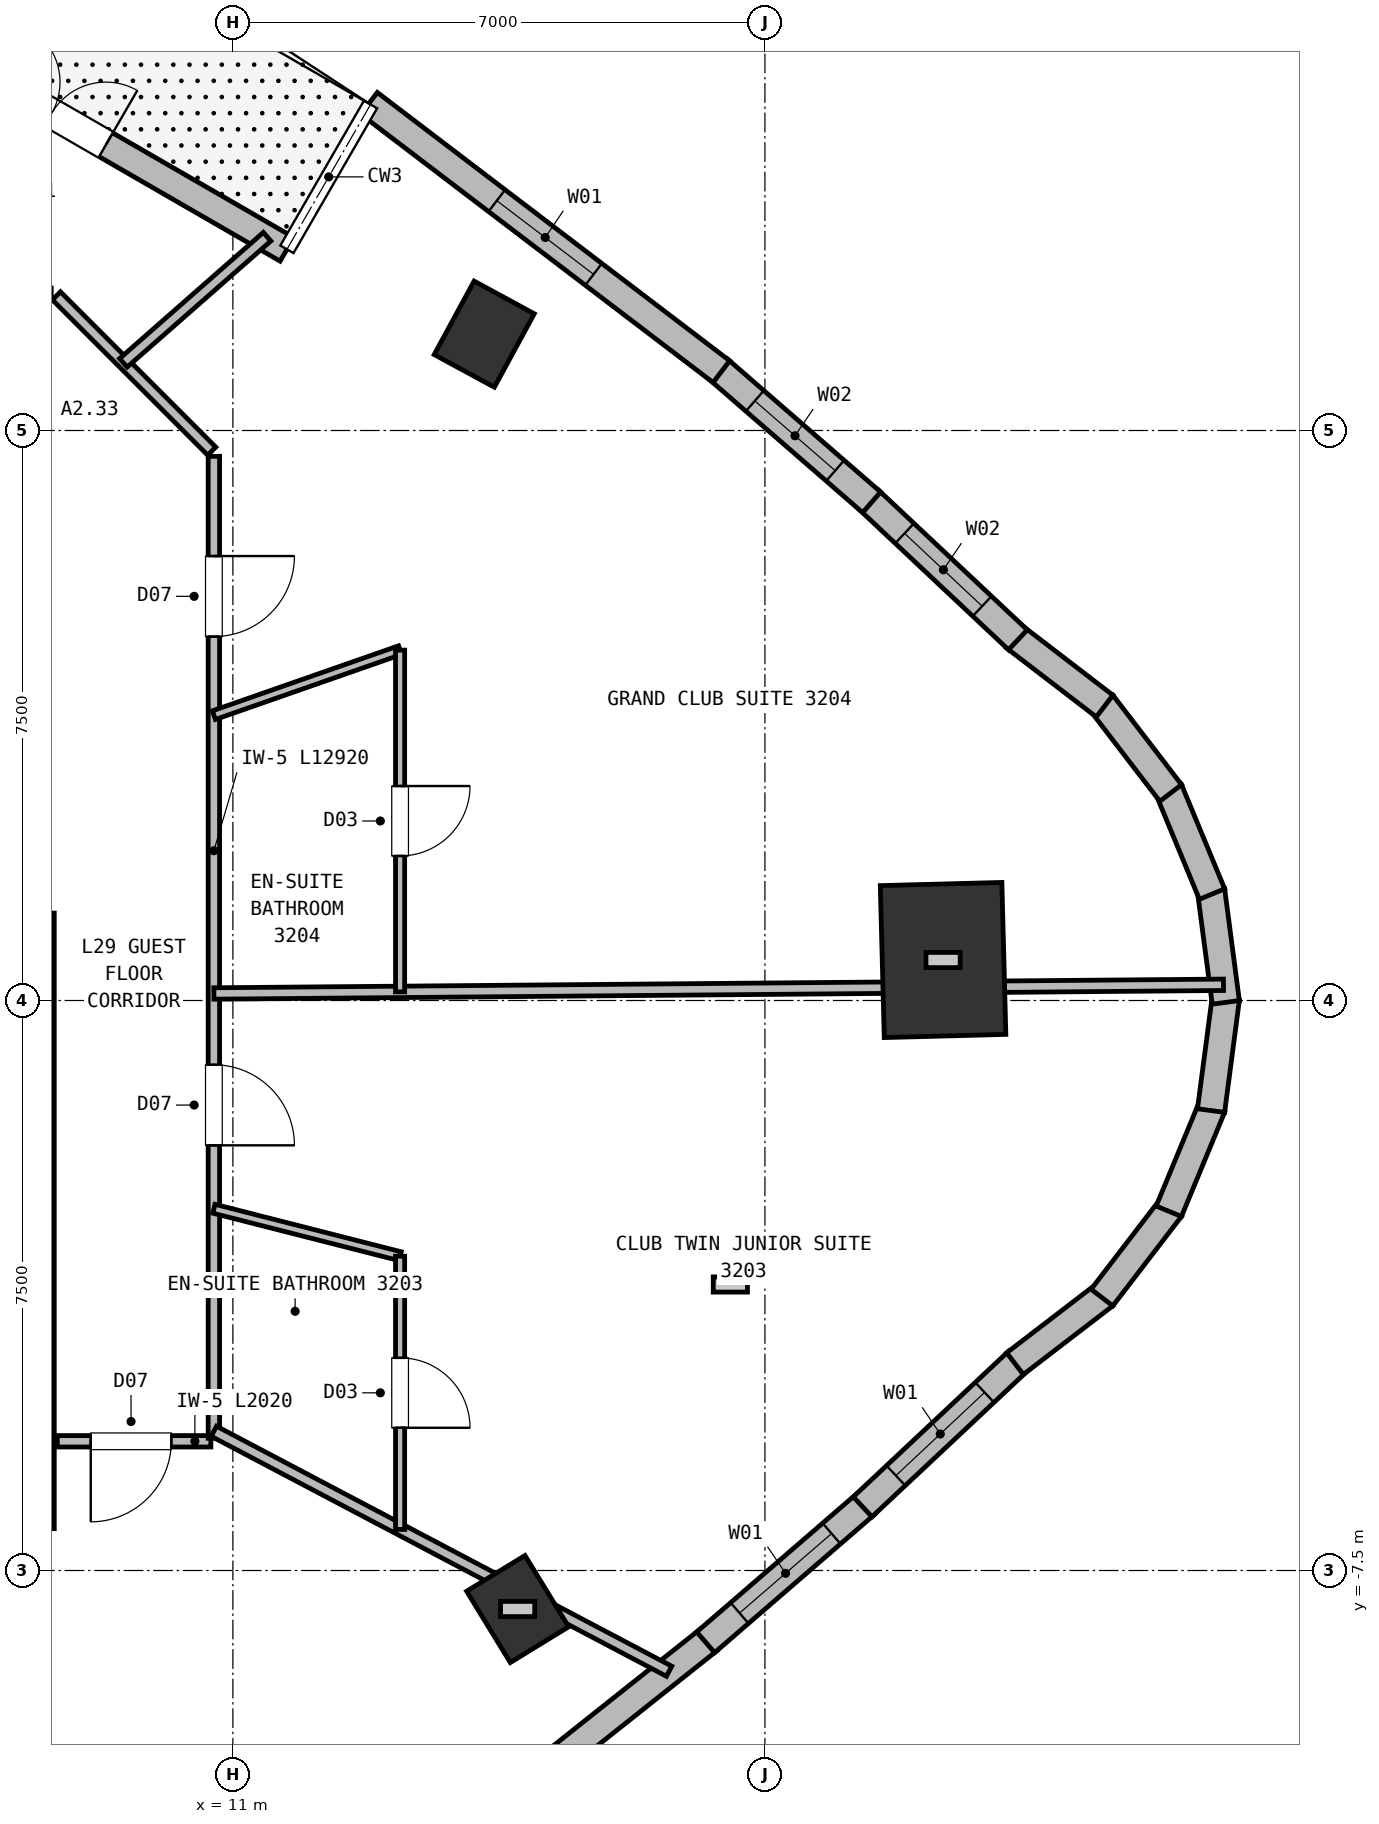
"""IFC4 building model, lengths in metres.
Left out: names, types, materials, properties, quantities, classifications, styles, units other than length and angle.
Written with IfcOpenShell. Run it as: python <this file> out.ifc"""

import sys

from ifc_helpers import new_model, si_unit, direction, frame, frame_2d, origin, origin_2d, place, context, subcontext, project, spatial, rectangle, extrude, element, fill, save


model = new_model("IFC4")
c1 = context("Model", 3, precision=1e-05, world=origin(), true_north=direction((0.0, 1.0)))
c2 = subcontext(c1, "Body", "Model", "MODEL_VIEW")
j1 = project(units=[si_unit("LENGTHUNIT", "METRE"), si_unit("PLANEANGLEUNIT", "RADIAN")], contexts=[c1])
p1 = place(None, origin())
s1 = spatial("IfcSite", under=j1, at=p1, CompositionType="ELEMENT")
p2 = place(p1, origin())
s2 = spatial("IfcBuilding", under=s1, at=p2, CompositionType="ELEMENT")
p3 = place(p2, frame((0.0, 0.0, 119.75)))
s3 = spatial("IfcBuildingStorey", under=s2, at=p3, CompositionType="ELEMENT", Elevation=119.75)
p4 = place(p3, frame((8.35, -6.95, 0.0), z_axis=(0.0, 0.0, 1.0), x_axis=(0.0, 1.0, 0.0)))
e1 = element("IfcWall", 1, at=p4, inside=s3, PredefinedType="SHEAR", context=c2, shape_type="SweptSolid", body=[
    extrude(rectangle(XDim=8.1, YDim=0.6, at=frame_2d((4.05, 0.0))), origin(), (0.0, 0.0, 1.0), 3.5),
])
p5 = place(p3, frame((14.747, -8.007, 0.0), z_axis=(0.0, 0.0, 1.0), x_axis=(0.852640164354, 0.522498564716, 0.0)))
e2 = element("IfcColumn", 2, at=p5, inside=s3, PredefinedType="COLUMN", context=c2, shape_type="SweptSolid", body=[
    extrude(rectangle(XDim=0.9, YDim=1.1, at=origin_2d()), origin(), (0.0, 0.0, 1.0), 3.75),
])
p6 = place(p3, frame((20.344, 0.533, 0.0), z_axis=(0.0, 0.0, 1.0), x_axis=(0.999657324976, 0.026176948308, 0.0)))
e3 = element("IfcColumn", 3, at=p6, inside=s3, PredefinedType="COLUMN", context=c2, shape_type="SweptSolid", body=[
    extrude(rectangle(XDim=1.6, YDim=2.0, at=origin_2d()), origin(), (0.0, 0.0, 1.0), 3.75),
])
p7 = place(p3, frame((14.307, 8.767, 0.0), z_axis=(0.0, 0.0, 1.0), x_axis=(-0.878817112662, 0.47715876026, 0.0)))
e4 = element("IfcColumn", 4, at=p7, inside=s3, PredefinedType="COLUMN", context=c2, shape_type="SweptSolid", body=[
    extrude(rectangle(XDim=0.9, YDim=1.1, at=origin_2d()), origin(), (0.0, 0.0, 1.0), 3.75),
])
p8 = place(p3, frame((2.705, 15.084, 0.0), z_axis=(0.0, 0.0, 1.0), x_axis=(0.866025696342, -0.499999493275, 0.0)))
e5 = element("IfcWall", 5, at=p8, inside=s3, PredefinedType="SOLIDWALL", context=c2, shape_type="SweptSolid", body=[
    extrude(rectangle(XDim=10.4, YDim=0.36, at=frame_2d((5.2, 0.0))), origin(), (0.0, 0.0, 1.0), 3.5),
])
p9 = place(p8, frame((6.0, 0.0, 0.0)))
e6 = element("IfcOpeningElement", 6, at=p9, cuts=e5, PredefinedType="OPENING", context=c2, shape_type="SweptSolid", body=[
    extrude(rectangle(XDim=1.65, YDim=2.25, at=frame_2d((0.825, 1.125))), frame((0.0, 0.19, 0.0), z_axis=(0.0, -1.0, 0.0), x_axis=(1.0, 0.0, 0.0)), (0.0, 0.0, 1.0), 0.38),
])
p10 = place(p3, frame((17.259, -8.413, 0.0), z_axis=(0.0, 0.0, 1.0), x_axis=(-0.783005616034, -0.622014634281, 0.0)))
e7 = element("IfcWall", 7, at=p10, inside=s3, PredefinedType="SOLIDWALL", context=c2, shape_type="SweptSolid", body=[
    extrude(rectangle(XDim=2.759, YDim=0.36, at=frame_2d((1.379, 0.0))), origin(), (0.0, 0.0, 1.0), 3.5),
])
p11 = place(p3, frame((19.323, -6.629, 0.0), z_axis=(0.0, 0.0, 1.0), x_axis=(-0.756738013258, -0.65371827211, 0.0)))
e8 = element("IfcWall", 8, at=p11, inside=s3, PredefinedType="SOLIDWALL", context=c2, shape_type="SweptSolid", body=[
    extrude(rectangle(XDim=2.777, YDim=0.36, at=frame_2d((1.389, 0.0))), origin(), (0.0, 0.0, 1.0), 3.5),
])
p12 = place(p11, frame((0.589, 0.0, 0.72)))
e9 = element("IfcOpeningElement", 9, at=p12, cuts=e8, PredefinedType="OPENING", context=c2, shape_type="SweptSolid", body=[
    extrude(rectangle(XDim=1.6, YDim=1.88, at=frame_2d((0.8, 0.94))), frame((0.0, 0.19, 0.0), z_axis=(0.0, -1.0, 0.0), x_axis=(1.0, 0.0, 0.0)), (0.0, 0.0, 1.0), 0.38),
])
p13 = place(p3, frame((21.329, -4.746, 0.0), z_axis=(0.0, 0.0, 1.0), x_axis=(-0.729447500313, -0.684036800389, 0.0)))
e10 = element("IfcWall", 10, at=p13, inside=s3, PredefinedType="SOLIDWALL", context=c2, shape_type="SweptSolid", body=[
    extrude(rectangle(XDim=2.801, YDim=0.36, at=frame_2d((1.4, 0.0))), origin(), (0.0, 0.0, 1.0), 3.5),
])
p14 = place(p13, frame((0.601, 0.0, 0.72)))
e11 = element("IfcOpeningElement", 11, at=p14, cuts=e10, PredefinedType="OPENING", context=c2, shape_type="SweptSolid", body=[
    extrude(rectangle(XDim=1.6, YDim=1.88, at=frame_2d((0.8, 0.94))), frame((0.0, 0.19, 0.0), z_axis=(0.0, -1.0, 0.0), x_axis=(1.0, 0.0, 0.0)), (0.0, 0.0, 1.0), 0.38),
])
for number, where, z_axis, x_axis in (
    (12, (22.469, -3.874, 0.0), (0.0, 0.0, 1.0), (-0.793, -0.609, 0.0)),
    (13, (23.339, -2.73, 0.0), (0.0, 0.0, 1.0), (-0.609, -0.793, 0.0)),
    (14, (23.883, -1.4, 0.0), (0.0, 0.0, 1.0), (-0.383, -0.924, 0.0)),
    (15, (24.064, 0.025, 0.0), (0.0, 0.0, 1.0), (-0.131, -0.991, 0.0)),
    (16, (23.87, 1.448, 0.0), (0.0, 0.0, 1.0), (0.131, -0.991, 0.0)),
    (17, (23.314, 2.773, 0.0), (0.0, 0.0, 1.0), (0.383, -0.924, 0.0)),
    (18, (22.434, 3.909, 0.0), (0.0, 0.0, 1.0), (0.609, -0.793, 0.0)),
    (19, (21.291, 4.778, 0.0), (0.0, 0.0, 1.0), (0.793, -0.609, 0.0)),
):
    element("IfcWall", number, at=place(p3, frame(where, z_axis=z_axis, x_axis=x_axis)), inside=s3, PredefinedType="SOLIDWALL", context=c2, shape_type="SweptSolid", body=[
        extrude(rectangle(XDim=1.486, YDim=0.36, at=frame_2d((0.743, 0.0))), origin(), (0.0, 0.0, 1.0), 3.5),
    ])
p15 = place(p3, frame((19.367, 6.589, 0.0), z_axis=(0.0, 0.0, 1.0), x_axis=(0.728891962159, -0.684628736981, 0.0)))
e20 = element("IfcWall", 20, at=p15, inside=s3, PredefinedType="SOLIDWALL", context=c2, shape_type="SweptSolid", body=[
    extrude(rectangle(XDim=2.692, YDim=0.36, at=frame_2d((1.346, 0.0))), origin(), (0.0, 0.0, 1.0), 3.5),
])
p16 = place(p15, frame((0.646, 0.0, 0.72)))
e21 = element("IfcOpeningElement", 21, at=p16, cuts=e20, PredefinedType="OPENING", context=c2, shape_type="SweptSolid", body=[
    extrude(rectangle(XDim=1.4, YDim=1.84, at=frame_2d((0.7, 0.92))), frame((0.0, 0.19, 0.0), z_axis=(0.0, -1.0, 0.0), x_axis=(1.0, 0.0, 0.0)), (0.0, 0.0, 1.0), 0.38),
])
p17 = place(p3, frame((17.388, 8.306, 0.0), z_axis=(0.0, 0.0, 1.0), x_axis=(0.755058136048, -0.655657846126, 0.0)))
e22 = element("IfcWall", 22, at=p17, inside=s3, PredefinedType="SOLIDWALL", context=c2, shape_type="SweptSolid", body=[
    extrude(rectangle(XDim=2.67, YDim=0.36, at=frame_2d((1.335, 0.0))), origin(), (0.0, 0.0, 1.0), 3.5),
])
p18 = place(p17, frame((0.635, 0.0, 0.72)))
e23 = element("IfcOpeningElement", 23, at=p18, cuts=e22, PredefinedType="OPENING", context=c2, shape_type="SweptSolid", body=[
    extrude(rectangle(XDim=1.4, YDim=1.84, at=frame_2d((0.7, 0.92))), frame((0.0, 0.19, 0.0), z_axis=(0.0, -1.0, 0.0), x_axis=(1.0, 0.0, 0.0)), (0.0, 0.0, 1.0), 0.38),
])
p19 = place(p3, frame((12.791, 11.805, 0.0), z_axis=(0.0, 0.0, 1.0), x_axis=(0.795558665525, -0.605876563095, 0.0)))
e24 = element("IfcWall", 24, at=p19, inside=s3, PredefinedType="SOLIDWALL", context=c2, shape_type="SweptSolid", body=[
    extrude(rectangle(XDim=5.827, YDim=0.36, at=frame_2d((2.913, 0.0))), origin(), (0.0, 0.0, 1.0), 3.5),
])
p20 = place(p19, frame((2.113, 0.0, 0.72)))
e25 = element("IfcOpeningElement", 25, at=p20, cuts=e24, PredefinedType="OPENING", context=c2, shape_type="SweptSolid", body=[
    extrude(rectangle(XDim=1.6, YDim=1.88, at=frame_2d((0.8, 0.94))), frame((0.0, 0.19, 0.0), z_axis=(0.0, -1.0, 0.0), x_axis=(1.0, 0.0, 0.0)), (0.0, 0.0, 1.0), 0.38),
])
p21 = place(p3, frame((10.71, -5.8, 0.0), z_axis=(0.0, 0.0, 1.0), x_axis=(-1.0, 0.0, 0.0)))
e26 = element("IfcWall", 26, at=p21, inside=s3, PredefinedType="PARTITIONING", context=c2, shape_type="SweptSolid", body=[
    extrude(rectangle(XDim=2.02, YDim=0.15, at=frame_2d((1.01, 0.0))), origin(), (0.0, 0.0, 1.0), 3.5),
])
p22 = place(p21, frame((0.52, 0.0, 0.0)))
e27 = element("IfcOpeningElement", 27, at=p22, cuts=e26, PredefinedType="OPENING", context=c2, shape_type="SweptSolid", body=[
    extrude(rectangle(XDim=1.06, YDim=2.15, at=frame_2d((0.53, 1.075))), frame((0.0, 0.085, 0.0), z_axis=(0.0, -1.0, 0.0), x_axis=(1.0, 0.0, 0.0)), (0.0, 0.0, 1.0), 0.17),
])
p23 = place(p3, frame((10.75, 7.16, 0.0), z_axis=(0.0, 0.0, 1.0), x_axis=(0.0, -1.0, 0.0)))
e28 = element("IfcWall", 28, at=p23, inside=s3, PredefinedType="PARTITIONING", context=c2, shape_type="SweptSolid", body=[
    extrude(rectangle(XDim=12.92, YDim=0.15, at=frame_2d((6.46, 0.0))), origin(), (0.0, 0.0, 1.0), 3.5),
])
p24 = place(p23, frame((8.006, 0.0, 0.0)))
e29 = element("IfcOpeningElement", 29, at=p24, cuts=e28, PredefinedType="OPENING", context=c2, shape_type="SweptSolid", body=[
    extrude(rectangle(XDim=1.06, YDim=2.15, at=frame_2d((0.53, 1.075))), frame((0.0, 0.085, 0.0), z_axis=(0.0, -1.0, 0.0), x_axis=(1.0, 0.0, 0.0)), (0.0, 0.0, 1.0), 0.17),
])
p25 = place(p23, frame((1.312, 0.0, 0.0)))
e30 = element("IfcOpeningElement", 30, at=p25, cuts=e28, PredefinedType="OPENING", context=c2, shape_type="SweptSolid", body=[
    extrude(rectangle(XDim=1.06, YDim=2.15, at=frame_2d((0.53, 1.075))), frame((0.0, 0.085, 0.0), z_axis=(0.0, -1.0, 0.0), x_axis=(1.0, 0.0, 0.0)), (0.0, 0.0, 1.0), 0.17),
])
p26 = place(p3, frame((8.678, 9.272, 0.0), z_axis=(0.0, 0.0, 1.0), x_axis=(0.707106781187, -0.707106781187, 0.0)))
e31 = element("IfcWall", 31, at=p26, inside=s3, PredefinedType="PARTITIONING", context=c2, shape_type="SweptSolid", body=[
    extrude(rectangle(XDim=2.89, YDim=0.15, at=frame_2d((1.445, 0.0))), origin(), (0.0, 0.0, 1.0), 3.5),
])
p27 = place(p3, frame((10.75, -5.668, 0.0), z_axis=(0.0, 0.0, 1.0), x_axis=(0.884577755421, -0.466392747172, 0.0)))
e32 = element("IfcWall", 32, at=p27, inside=s3, PredefinedType="PARTITIONING", context=c2, shape_type="SweptSolid", body=[
    extrude(rectangle(XDim=6.771, YDim=0.15, at=frame_2d((3.385, 0.0))), origin(), (0.0, 0.0, 1.0), 3.5),
])
p28 = place(p3, frame((10.75, -2.74, 0.0), z_axis=(0.0, 0.0, 1.0), x_axis=(0.969013175756, -0.247009038723, 0.0)))
e33 = element("IfcWall", 33, at=p28, inside=s3, PredefinedType="PARTITIONING", context=c2, shape_type="SweptSolid", body=[
    extrude(rectangle(XDim=2.528, YDim=0.12, at=frame_2d((1.264, 0.0))), origin(), (0.0, 0.0, 1.0), 3.5),
])
p29 = place(p3, frame((13.2, -3.365, 0.0), z_axis=(0.0, 0.0, 1.0), x_axis=(0.0, -1.0, 0.0)))
e34 = element("IfcWall", 34, at=p29, inside=s3, PredefinedType="PARTITIONING", context=c2, shape_type="SweptSolid", body=[
    extrude(rectangle(XDim=3.595, YDim=0.12, at=frame_2d((1.798, 0.0))), origin(), (0.0, 0.0, 1.0), 3.5),
])
p30 = place(p29, frame((1.337, 0.0, 0.0)))
e35 = element("IfcOpeningElement", 35, at=p30, cuts=e34, PredefinedType="OPENING", context=c2, shape_type="SweptSolid", body=[
    extrude(rectangle(XDim=0.92, YDim=2.1, at=frame_2d((0.46, 1.05))), frame((0.0, 0.07, 0.0), z_axis=(0.0, -1.0, 0.0), x_axis=(1.0, 0.0, 0.0)), (0.0, 0.0, 1.0), 0.14),
])
p31 = place(p3, frame((10.75, 0.092, 0.0), z_axis=(0.0, 0.0, 1.0), x_axis=(0.999962849389, 0.008619735634, 0.0)))
e36 = element("IfcWall", 36, at=p31, inside=s3, PredefinedType="PARTITIONING", context=c2, shape_type="SweptSolid", body=[
    extrude(rectangle(XDim=13.284, YDim=0.15, at=frame_2d((6.642, 0.0))), origin(), (0.0, 0.0, 1.0), 3.5),
])
p32 = place(p3, frame((13.2, 4.61, 0.0), z_axis=(0.0, 0.0, 1.0), x_axis=(-0.944070831108, -0.32974272676, 0.0)))
e37 = element("IfcWall", 37, at=p32, inside=s3, PredefinedType="PARTITIONING", context=c2, shape_type="SweptSolid", body=[
    extrude(rectangle(XDim=2.595, YDim=0.12, at=frame_2d((1.297, 0.0))), origin(), (0.0, 0.0, 1.0), 3.5),
])
p33 = place(p3, frame((13.2, 4.61, 0.0), z_axis=(0.0, 0.0, 1.0), x_axis=(0.0, -1.0, 0.0)))
e38 = element("IfcWall", 38, at=p33, inside=s3, PredefinedType="PARTITIONING", context=c2, shape_type="SweptSolid", body=[
    extrude(rectangle(XDim=4.497, YDim=0.12, at=frame_2d((2.248, 0.0))), origin(), (0.0, 0.0, 1.0), 3.5),
])
p34 = place(p33, frame((1.788, 0.0, 0.0)))
e39 = element("IfcOpeningElement", 39, at=p34, cuts=e38, PredefinedType="OPENING", context=c2, shape_type="SweptSolid", body=[
    extrude(rectangle(XDim=0.92, YDim=2.1, at=frame_2d((0.46, 1.05))), frame((0.0, 0.07, 0.0), z_axis=(0.0, -1.0, 0.0), x_axis=(1.0, 0.0, 0.0)), (0.0, 0.0, 1.0), 0.14),
])
p35 = place(p3, frame((9.56, 8.39, 0.0), z_axis=(0.0, 0.0, 1.0), x_axis=(0.751523551738, 0.659706261289, 0.0)))
e40 = element("IfcWall", 40, at=p35, inside=s3, PredefinedType="PARTITIONING", context=c2, shape_type="SweptSolid", body=[
    extrude(rectangle(XDim=2.515, YDim=0.15, at=frame_2d((1.258, 0.0))), origin(), (0.0, 0.0, 1.0), 3.5),
])
p36 = place(p9, origin())
e41 = element("IfcDoor", 41, at=p36, inside=s3, OperationType="DOUBLE_DOOR_SINGLE_SWING", PredefinedType="DOOR", context=c2, shape_type="SweptSolid", body=[
    extrude(rectangle(XDim=1.65, YDim=2.25, at=frame_2d((0.825, 1.125))), frame((0.0, 0.025, 0.0), z_axis=(0.0, -1.0, 0.0), x_axis=(1.0, 0.0, 0.0)), (0.0, 0.0, 1.0), 0.05),
])
fill(e6, e41)
p37 = place(p12, origin())
e42 = element("IfcWindow", 42, at=p37, inside=s3, PartitioningType="SINGLE_PANEL", PredefinedType="WINDOW", context=c2, shape_type="SweptSolid", body=[
    extrude(rectangle(XDim=1.6, YDim=1.88, at=frame_2d((0.8, 0.94))), frame((0.0, 0.03, 0.0), z_axis=(0.0, -1.0, 0.0), x_axis=(1.0, 0.0, 0.0)), (0.0, 0.0, 1.0), 0.06),
])
fill(e9, e42)
p38 = place(p14, origin())
e43 = element("IfcWindow", 43, at=p38, inside=s3, PartitioningType="SINGLE_PANEL", PredefinedType="WINDOW", context=c2, shape_type="SweptSolid", body=[
    extrude(rectangle(XDim=1.6, YDim=1.88, at=frame_2d((0.8, 0.94))), frame((0.0, 0.03, 0.0), z_axis=(0.0, -1.0, 0.0), x_axis=(1.0, 0.0, 0.0)), (0.0, 0.0, 1.0), 0.06),
])
fill(e11, e43)
p39 = place(p16, origin())
e44 = element("IfcWindow", 44, at=p39, inside=s3, PartitioningType="SINGLE_PANEL", PredefinedType="WINDOW", context=c2, shape_type="SweptSolid", body=[
    extrude(rectangle(XDim=1.4, YDim=1.84, at=frame_2d((0.7, 0.92))), frame((0.0, 0.03, 0.0), z_axis=(0.0, -1.0, 0.0), x_axis=(1.0, 0.0, 0.0)), (0.0, 0.0, 1.0), 0.06),
])
fill(e21, e44)
p40 = place(p18, origin())
e45 = element("IfcWindow", 45, at=p40, inside=s3, PartitioningType="SINGLE_PANEL", PredefinedType="WINDOW", context=c2, shape_type="SweptSolid", body=[
    extrude(rectangle(XDim=1.4, YDim=1.84, at=frame_2d((0.7, 0.92))), frame((0.0, 0.03, 0.0), z_axis=(0.0, -1.0, 0.0), x_axis=(1.0, 0.0, 0.0)), (0.0, 0.0, 1.0), 0.06),
])
fill(e23, e45)
p41 = place(p20, origin())
e46 = element("IfcWindow", 46, at=p41, inside=s3, PartitioningType="SINGLE_PANEL", PredefinedType="WINDOW", context=c2, shape_type="SweptSolid", body=[
    extrude(rectangle(XDim=1.6, YDim=1.88, at=frame_2d((0.8, 0.94))), frame((0.0, 0.03, 0.0), z_axis=(0.0, -1.0, 0.0), x_axis=(1.0, 0.0, 0.0)), (0.0, 0.0, 1.0), 0.06),
])
fill(e25, e46)
p42 = place(p30, origin())
e47 = element("IfcDoor", 47, at=p42, inside=s3, OperationType="SINGLE_SWING_RIGHT", PredefinedType="DOOR", context=c2, shape_type="SweptSolid", body=[
    extrude(rectangle(XDim=0.92, YDim=2.1, at=frame_2d((0.46, 1.05))), frame((0.0, 0.025, 0.0), z_axis=(0.0, -1.0, 0.0), x_axis=(1.0, 0.0, 0.0)), (0.0, 0.0, 1.0), 0.05),
])
fill(e35, e47)
p43 = place(p34, origin())
e48 = element("IfcDoor", 48, at=p43, inside=s3, OperationType="SINGLE_SWING_LEFT", PredefinedType="DOOR", context=c2, shape_type="SweptSolid", body=[
    extrude(rectangle(XDim=0.92, YDim=2.1, at=frame_2d((0.46, 1.05))), frame((0.0, 0.025, 0.0), z_axis=(0.0, -1.0, 0.0), x_axis=(1.0, 0.0, 0.0)), (0.0, 0.0, 1.0), 0.05),
])
fill(e39, e48)
p44 = place(p24, origin())
e49 = element("IfcDoor", 49, at=p44, inside=s3, OperationType="SINGLE_SWING_RIGHT", PredefinedType="DOOR", context=c2, shape_type="SweptSolid", body=[
    extrude(rectangle(XDim=1.06, YDim=2.15, at=frame_2d((0.53, 1.075))), frame((0.0, 0.025, 0.0), z_axis=(0.0, -1.0, 0.0), x_axis=(1.0, 0.0, 0.0)), (0.0, 0.0, 1.0), 0.05),
])
fill(e29, e49)
p45 = place(p25, origin())
e50 = element("IfcDoor", 50, at=p45, inside=s3, OperationType="SINGLE_SWING_LEFT", PredefinedType="DOOR", context=c2, shape_type="SweptSolid", body=[
    extrude(rectangle(XDim=1.06, YDim=2.15, at=frame_2d((0.53, 1.075))), frame((0.0, 0.025, 0.0), z_axis=(0.0, -1.0, 0.0), x_axis=(1.0, 0.0, 0.0)), (0.0, 0.0, 1.0), 0.05),
])
fill(e30, e50)
p46 = place(p22, origin())
e51 = element("IfcDoor", 51, at=p46, inside=s3, OperationType="SINGLE_SWING_RIGHT", PredefinedType="DOOR", context=c2, shape_type="SweptSolid", body=[
    extrude(rectangle(XDim=1.06, YDim=2.15, at=frame_2d((0.53, 1.075))), frame((0.0, 0.025, 0.0), z_axis=(0.0, -1.0, 0.0), x_axis=(1.0, 0.0, 0.0)), (0.0, 0.0, 1.0), 0.05),
])
fill(e27, e51)
save(model, sys.argv[1])
